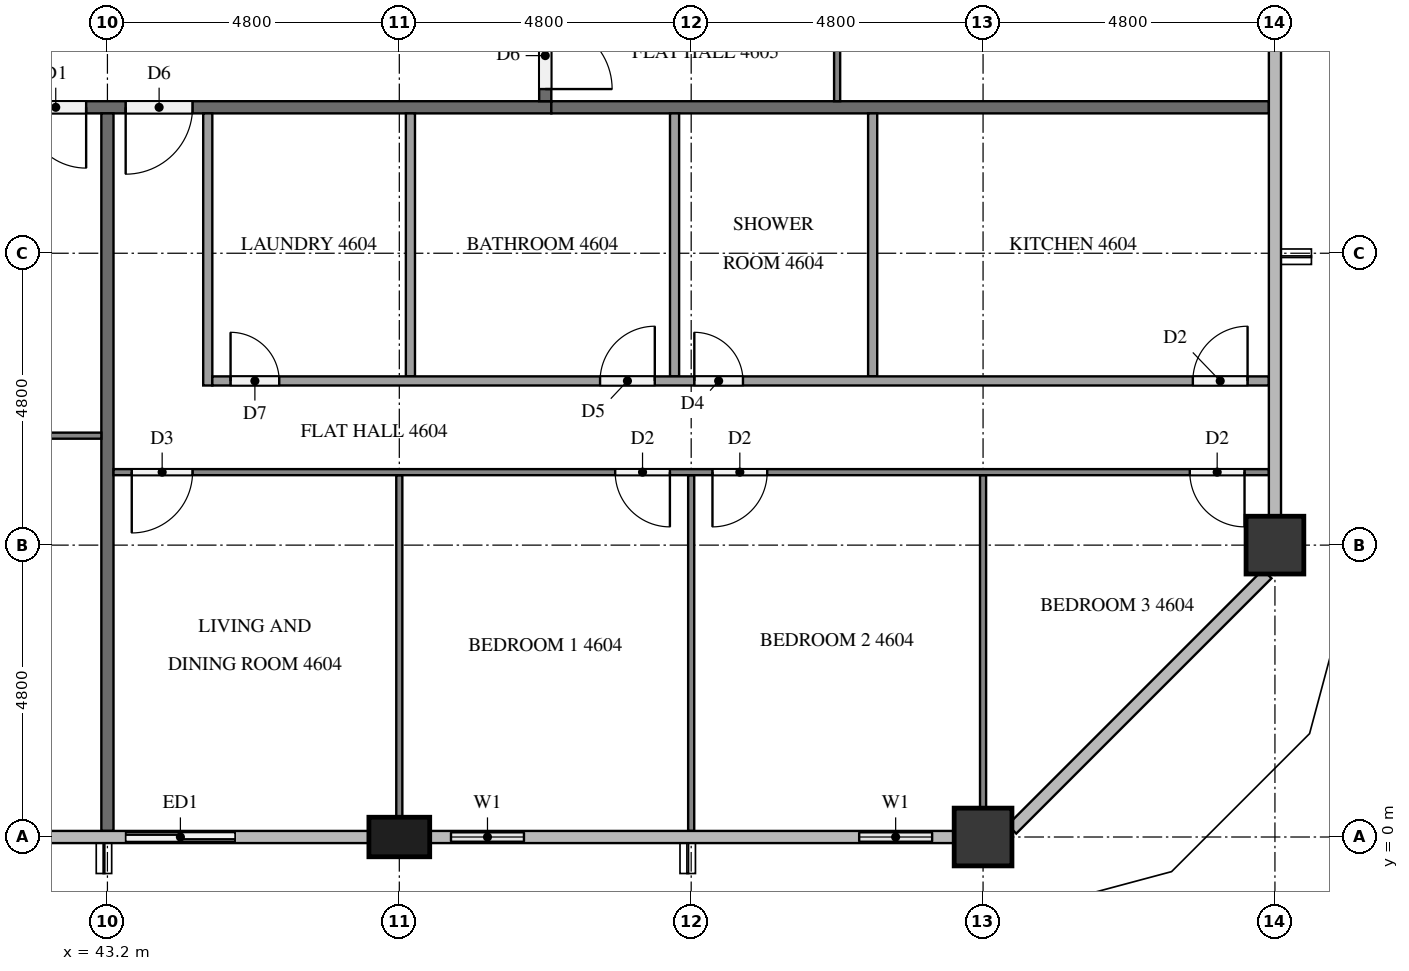
"""IFC4 building model, lengths in metres.
Left out: names, types, materials, properties, quantities, classifications, styles, units other than length and angle.
Written with IfcOpenShell. Run it as: python <this file> out.ifc"""

import sys

from ifc_helpers import new_model, si_unit, direction, frame, frame_2d, origin, origin_2d, place, context, subcontext, project, spatial, rectangle, extrude, element, fill, save


model = new_model("IFC4")
c1 = context("Model", 3, precision=1e-05, world=origin(), true_north=direction((0.0, 1.0)))
c2 = subcontext(c1, "Body", "Model", "MODEL_VIEW")
j1 = project(units=[si_unit("LENGTHUNIT", "METRE"), si_unit("PLANEANGLEUNIT", "RADIAN")], contexts=[c1])
p1 = place(None, origin())
s1 = spatial("IfcSite", under=j1, at=p1, CompositionType="ELEMENT")
p2 = place(p1, origin())
s2 = spatial("IfcBuilding", under=s1, at=p2, CompositionType="ELEMENT")
p3 = place(p2, frame((0.0, 0.0, 178.9)))
s3 = spatial("IfcBuildingStorey", under=s2, at=p3, CompositionType="ELEMENT", Elevation=178.9)
p4 = place(p3, frame((48.0, 0.0, 0.0), z_axis=(0.0, 0.0, 1.0), x_axis=(1.0, 0.0, 0.0)))
e1 = element("IfcColumn", 1, at=p4, inside=s3, PredefinedType="COLUMN", context=c2, shape_type="SweptSolid", body=[
    extrude(rectangle(XDim=1.0, YDim=0.65, at=origin_2d()), origin(), (0.0, 0.0, 1.0), 3.2),
])
for number, where, z_axis, x_axis in (
    (2, (57.6, 0.0, 0.0), (0.0, 0.0, 1.0), (1.0, 0.0, 0.0)),
    (3, (62.4, 4.8, 0.0), (0.0, 0.0, 1.0), (1.0, 0.0, 0.0)),
):
    element("IfcColumn", number, at=place(p3, frame(where, z_axis=z_axis, x_axis=x_axis)), inside=s3, PredefinedType="COLUMN", context=c2, shape_type="SweptSolid", body=[
        extrude(rectangle(XDim=0.95, YDim=0.95, at=origin_2d()), origin(), (0.0, 0.0, 1.0), 3.2),
    ])
p5 = place(p3, frame((43.2, 0.0, 0.0), z_axis=(0.0, 0.0, 1.0), x_axis=(1.0, 0.0, 0.0)))
e4 = element("IfcWall", 4, at=p5, inside=s3, PredefinedType="SOLIDWALL", context=c2, shape_type="SweptSolid", body=[
    extrude(rectangle(XDim=2.4, YDim=0.15, at=frame_2d((1.2, 0.0))), origin(), (0.0, 0.0, 1.0), 3.2),
])
p6 = place(p5, frame((0.3, 0.0, 0.0)))
e5 = element("IfcOpeningElement", 5, at=p6, cuts=e4, PredefinedType="OPENING", context=c2, shape_type="SweptSolid", body=[
    extrude(rectangle(XDim=1.8, YDim=2.4, at=frame_2d((0.9, 1.2))), frame((0.0, 0.085, 0.0), z_axis=(0.0, -1.0, 0.0), x_axis=(1.0, 0.0, 0.0)), (0.0, 0.0, 1.0), 0.17),
])
p7 = place(p3, frame((48.5, 0.0, 0.0), z_axis=(0.0, 0.0, 1.0), x_axis=(1.0, 0.0, 0.0)))
e6 = element("IfcWall", 6, at=p7, inside=s3, PredefinedType="SOLIDWALL", context=c2, shape_type="SweptSolid", body=[
    extrude(rectangle(XDim=1.9, YDim=0.15, at=frame_2d((0.95, 0.0))), origin(), (0.0, 0.0, 1.0), 3.2),
])
p8 = place(p7, frame((0.35, 0.0, 0.9)))
e7 = element("IfcOpeningElement", 7, at=p8, cuts=e6, PredefinedType="OPENING", context=c2, shape_type="SweptSolid", body=[
    extrude(rectangle(XDim=1.2, YDim=1.4, at=frame_2d((0.6, 0.7))), frame((0.0, 0.085, 0.0), z_axis=(0.0, -1.0, 0.0), x_axis=(1.0, 0.0, 0.0)), (0.0, 0.0, 1.0), 0.17),
])
p9 = place(p3, frame((55.2, 0.0, 0.0), z_axis=(0.0, 0.0, 1.0), x_axis=(1.0, 0.0, 0.0)))
e8 = element("IfcWall", 8, at=p9, inside=s3, PredefinedType="SOLIDWALL", context=c2, shape_type="SweptSolid", body=[
    extrude(rectangle(XDim=1.925, YDim=0.15, at=frame_2d((0.962, 0.0))), origin(), (0.0, 0.0, 1.0), 3.2),
])
p10 = place(p9, frame((0.363, 0.0, 0.9)))
e9 = element("IfcOpeningElement", 9, at=p10, cuts=e8, PredefinedType="OPENING", context=c2, shape_type="SweptSolid", body=[
    extrude(rectangle(XDim=1.2, YDim=1.4, at=frame_2d((0.6, 0.7))), frame((0.0, 0.085, 0.0), z_axis=(0.0, -1.0, 0.0), x_axis=(1.0, 0.0, 0.0)), (0.0, 0.0, 1.0), 0.17),
])
p11 = place(p3, frame((50.5, 12.0, 0.0), z_axis=(0.0, 0.0, 1.0), x_axis=(-1.0, 0.0, 0.0)))
e10 = element("IfcWall", 10, at=p11, inside=s3, PredefinedType="PARTITIONING", context=c2, shape_type="SweptSolid", body=[
    extrude(rectangle(XDim=38.6, YDim=0.2, at=frame_2d((19.3, 0.0))), origin(), (0.0, 0.0, 1.0), 3.2),
])
p12 = place(p11, frame((31.65, 0.0, 0.0)))
e11 = element("IfcOpeningElement", 11, at=p12, cuts=e10, PredefinedType="OPENING", context=c2, shape_type="SweptSolid", body=[
    extrude(rectangle(XDim=1.0, YDim=2.1, at=frame_2d((0.5, 1.05))), frame((0.0, 0.11, 0.0), z_axis=(0.0, -1.0, 0.0), x_axis=(1.0, 0.0, 0.0)), (0.0, 0.0, 1.0), 0.22),
])
p13 = place(p11, frame((17.25, 0.0, 0.0)))
e12 = element("IfcOpeningElement", 12, at=p13, cuts=e10, PredefinedType="OPENING", context=c2, shape_type="SweptSolid", body=[
    extrude(rectangle(XDim=1.0, YDim=2.1, at=frame_2d((0.5, 1.05))), frame((0.0, 0.11, 0.0), z_axis=(0.0, -1.0, 0.0), x_axis=(1.0, 0.0, 0.0)), (0.0, 0.0, 1.0), 0.22),
])
p14 = place(p11, frame((7.65, 0.0, 0.0)))
e13 = element("IfcOpeningElement", 13, at=p14, cuts=e10, PredefinedType="OPENING", context=c2, shape_type="SweptSolid", body=[
    extrude(rectangle(XDim=1.0, YDim=2.1, at=frame_2d((0.5, 1.05))), frame((0.0, 0.11, 0.0), z_axis=(0.0, -1.0, 0.0), x_axis=(1.0, 0.0, 0.0)), (0.0, 0.0, 1.0), 0.22),
])
p15 = place(p11, frame((5.9, 0.0, 0.0)))
e14 = element("IfcOpeningElement", 14, at=p15, cuts=e10, PredefinedType="OPENING", context=c2, shape_type="SweptSolid", body=[
    extrude(rectangle(XDim=1.1, YDim=2.1, at=frame_2d((0.55, 1.05))), frame((0.0, 0.11, 0.0), z_axis=(0.0, -1.0, 0.0), x_axis=(1.0, 0.0, 0.0)), (0.0, 0.0, 1.0), 0.22),
])
p16 = place(p3, frame((50.4, 40.7, 0.0), z_axis=(0.0, 0.0, 1.0), x_axis=(0.0, -1.0, 0.0)))
e15 = element("IfcWall", 15, at=p16, inside=s3, PredefinedType="PARTITIONING", context=c2, shape_type="SweptSolid", body=[
    extrude(rectangle(XDim=28.6, YDim=0.2, at=frame_2d((14.3, 0.0))), origin(), (0.0, 0.0, 1.0), 3.2),
])
p17 = place(p16, frame((27.3, 0.0, 0.0)))
e16 = element("IfcOpeningElement", 16, at=p17, cuts=e15, PredefinedType="OPENING", context=c2, shape_type="SweptSolid", body=[
    extrude(rectangle(XDim=1.1, YDim=2.1, at=frame_2d((0.55, 1.05))), frame((0.0, 0.11, 0.0), z_axis=(0.0, -1.0, 0.0), x_axis=(1.0, 0.0, 0.0)), (0.0, 0.0, 1.0), 0.22),
])
p18 = place(p16, frame((8.15, 0.0, 0.0)))
e17 = element("IfcOpeningElement", 17, at=p18, cuts=e15, PredefinedType="OPENING", context=c2, shape_type="SweptSolid", body=[
    extrude(rectangle(XDim=1.0, YDim=2.1, at=frame_2d((0.5, 1.05))), frame((0.0, 0.11, 0.0), z_axis=(0.0, -1.0, 0.0), x_axis=(1.0, 0.0, 0.0)), (0.0, 0.0, 1.0), 0.22),
])
p19 = place(p16, frame((0.95, 0.0, 0.0)))
e18 = element("IfcOpeningElement", 18, at=p19, cuts=e15, PredefinedType="OPENING", context=c2, shape_type="SweptSolid", body=[
    extrude(rectangle(XDim=1.0, YDim=2.1, at=frame_2d((0.5, 1.05))), frame((0.0, 0.11, 0.0), z_axis=(0.0, -1.0, 0.0), x_axis=(1.0, 0.0, 0.0)), (0.0, 0.0, 1.0), 0.22),
])
p20 = place(p3, frame((43.2, 11.9, 0.0), z_axis=(0.0, 0.0, 1.0), x_axis=(0.0, -1.0, 0.0)))
e19 = element("IfcWall", 19, at=p20, inside=s3, PredefinedType="PARTITIONING", context=c2, shape_type="SweptSolid", body=[
    extrude(rectangle(XDim=11.8, YDim=0.2, at=frame_2d((5.9, 0.0))), origin(), (0.0, 0.0, 1.0), 3.2),
])
p21 = place(p3, frame((50.5, 12.0, 0.0), z_axis=(0.0, 0.0, 1.0), x_axis=(1.0, 0.0, 0.0)))
e20 = element("IfcWall", 20, at=p21, inside=s3, PredefinedType="PARTITIONING", context=c2, shape_type="SweptSolid", body=[
    extrude(rectangle(XDim=11.8, YDim=0.2, at=frame_2d((5.9, 0.0))), origin(), (0.0, 0.0, 1.0), 3.2),
])
p22 = place(p3, frame((43.1, 6.6, 0.0), z_axis=(0.0, 0.0, 1.0), x_axis=(-1.0, 0.0, 0.0)))
e21 = element("IfcWall", 21, at=p22, inside=s3, PredefinedType="PARTITIONING", context=c2, shape_type="SweptSolid", body=[
    extrude(rectangle(XDim=9.4, YDim=0.1, at=frame_2d((4.7, 0.0))), origin(), (0.0, 0.0, 1.0), 3.2),
])
p23 = place(p22, frame((3.35, 0.0, 0.0)))
e22 = element("IfcOpeningElement", 22, at=p23, cuts=e21, PredefinedType="OPENING", context=c2, shape_type="SweptSolid", body=[
    extrude(rectangle(XDim=1.0, YDim=2.1, at=frame_2d((0.5, 1.05))), frame((0.0, 0.06, 0.0), z_axis=(0.0, -1.0, 0.0), x_axis=(1.0, 0.0, 0.0)), (0.0, 0.0, 1.0), 0.12),
])
p24 = place(p22, frame((5.05, 0.0, 0.0)))
e23 = element("IfcOpeningElement", 23, at=p24, cuts=e21, PredefinedType="OPENING", context=c2, shape_type="SweptSolid", body=[
    extrude(rectangle(XDim=0.9, YDim=2.1, at=frame_2d((0.45, 1.05))), frame((0.0, 0.06, 0.0), z_axis=(0.0, -1.0, 0.0), x_axis=(1.0, 0.0, 0.0)), (0.0, 0.0, 1.0), 0.12),
])
p25 = place(p3, frame((48.0, 5.95, 0.0), z_axis=(0.0, 0.0, 1.0), x_axis=(0.0, -1.0, 0.0)))
e24 = element("IfcWall", 24, at=p25, inside=s3, PredefinedType="PARTITIONING", context=c2, shape_type="SweptSolid", body=[
    extrude(rectangle(XDim=5.625, YDim=0.1, at=frame_2d((2.812, 0.0))), origin(), (0.0, 0.0, 1.0), 3.2),
])
p26 = place(p3, frame((52.8, 5.95, 0.0), z_axis=(0.0, 0.0, 1.0), x_axis=(0.0, -1.0, 0.0)))
e25 = element("IfcWall", 25, at=p26, inside=s3, PredefinedType="PARTITIONING", context=c2, shape_type="SweptSolid", body=[
    extrude(rectangle(XDim=5.85, YDim=0.1, at=frame_2d((2.925, 0.0))), origin(), (0.0, 0.0, 1.0), 3.2),
])
p27 = place(p3, frame((57.6, 5.95, 0.0), z_axis=(0.0, 0.0, 1.0), x_axis=(0.0, -1.0, 0.0)))
e26 = element("IfcWall", 26, at=p27, inside=s3, PredefinedType="PARTITIONING", context=c2, shape_type="SweptSolid", body=[
    extrude(rectangle(XDim=5.475, YDim=0.1, at=frame_2d((2.737, 0.0))), origin(), (0.0, 0.0, 1.0), 3.2),
])
p28 = place(p3, frame((62.3, 6.0, 0.0), z_axis=(0.0, 0.0, 1.0), x_axis=(-1.0, 0.0, 0.0)))
e27 = element("IfcWall", 27, at=p28, inside=s3, PredefinedType="PARTITIONING", context=c2, shape_type="SweptSolid", body=[
    extrude(rectangle(XDim=19.0, YDim=0.1, at=frame_2d((9.5, 0.0))), origin(), (0.0, 0.0, 1.0), 3.2),
])
p29 = place(p28, frame((17.7, 0.0, 0.0)))
e28 = element("IfcOpeningElement", 28, at=p29, cuts=e27, PredefinedType="OPENING", context=c2, shape_type="SweptSolid", body=[
    extrude(rectangle(XDim=1.0, YDim=2.1, at=frame_2d((0.5, 1.05))), frame((0.0, 0.06, 0.0), z_axis=(0.0, -1.0, 0.0), x_axis=(1.0, 0.0, 0.0)), (0.0, 0.0, 1.0), 0.12),
])
p30 = place(p28, frame((9.85, 0.0, 0.0)))
e29 = element("IfcOpeningElement", 29, at=p30, cuts=e27, PredefinedType="OPENING", context=c2, shape_type="SweptSolid", body=[
    extrude(rectangle(XDim=0.9, YDim=2.1, at=frame_2d((0.45, 1.05))), frame((0.0, 0.06, 0.0), z_axis=(0.0, -1.0, 0.0), x_axis=(1.0, 0.0, 0.0)), (0.0, 0.0, 1.0), 0.12),
])
p31 = place(p28, frame((8.25, 0.0, 0.0)))
e30 = element("IfcOpeningElement", 30, at=p31, cuts=e27, PredefinedType="OPENING", context=c2, shape_type="SweptSolid", body=[
    extrude(rectangle(XDim=0.9, YDim=2.1, at=frame_2d((0.45, 1.05))), frame((0.0, 0.06, 0.0), z_axis=(0.0, -1.0, 0.0), x_axis=(1.0, 0.0, 0.0)), (0.0, 0.0, 1.0), 0.12),
])
p32 = place(p28, frame((0.4, 0.0, 0.0)))
e31 = element("IfcOpeningElement", 31, at=p32, cuts=e27, PredefinedType="OPENING", context=c2, shape_type="SweptSolid", body=[
    extrude(rectangle(XDim=0.9, YDim=2.1, at=frame_2d((0.45, 1.05))), frame((0.0, 0.06, 0.0), z_axis=(0.0, -1.0, 0.0), x_axis=(1.0, 0.0, 0.0)), (0.0, 0.0, 1.0), 0.12),
])
for number, where, z_axis, x_axis in (
    (32, (48.183, 11.9, 0.0), (0.0, 0.0, 1.0), (0.0, -1.0, 0.0)),
    (33, (52.527, 11.9, 0.0), (0.0, 0.0, 1.0), (0.0, -1.0, 0.0)),
    (34, (55.784, 11.9, 0.0), (0.0, 0.0, 1.0), (0.0, -1.0, 0.0)),
):
    element("IfcWall", number, at=place(p3, frame(where, z_axis=z_axis, x_axis=x_axis)), inside=s3, PredefinedType="PARTITIONING", context=c2, shape_type="SweptSolid", body=[
        extrude(rectangle(XDim=4.325, YDim=0.15, at=frame_2d((2.163, 0.0))), origin(), (0.0, 0.0, 1.0), 3.2),
    ])
p33 = place(p3, frame((44.85, 11.9, 0.0), z_axis=(0.0, 0.0, 1.0), x_axis=(0.0, -1.0, 0.0)))
e35 = element("IfcWall", 35, at=p33, inside=s3, PredefinedType="PARTITIONING", context=c2, shape_type="SweptSolid", body=[
    extrude(rectangle(XDim=4.475, YDim=0.15, at=frame_2d((2.237, 0.0))), origin(), (0.0, 0.0, 1.0), 3.2),
])
p34 = place(p3, frame((44.925, 7.5, 0.0), z_axis=(0.0, 0.0, 1.0), x_axis=(1.0, 0.0, 0.0)))
e36 = element("IfcWall", 36, at=p34, inside=s3, PredefinedType="PARTITIONING", context=c2, shape_type="SweptSolid", body=[
    extrude(rectangle(XDim=17.375, YDim=0.15, at=frame_2d((8.688, 0.0))), origin(), (0.0, 0.0, 1.0), 3.2),
])
p35 = place(p34, frame((0.3, 0.0, 0.0)))
e37 = element("IfcOpeningElement", 37, at=p35, cuts=e36, PredefinedType="OPENING", context=c2, shape_type="SweptSolid", body=[
    extrude(rectangle(XDim=0.8, YDim=2.1, at=frame_2d((0.4, 1.05))), frame((0.0, 0.085, 0.0), z_axis=(0.0, -1.0, 0.0), x_axis=(1.0, 0.0, 0.0)), (0.0, 0.0, 1.0), 0.17),
])
p36 = place(p34, frame((6.377, 0.0, 0.0)))
e38 = element("IfcOpeningElement", 38, at=p36, cuts=e36, PredefinedType="OPENING", context=c2, shape_type="SweptSolid", body=[
    extrude(rectangle(XDim=0.9, YDim=2.1, at=frame_2d((0.45, 1.05))), frame((0.0, 0.085, 0.0), z_axis=(0.0, -1.0, 0.0), x_axis=(1.0, 0.0, 0.0)), (0.0, 0.0, 1.0), 0.17),
])
p37 = place(p34, frame((7.927, 0.0, 0.0)))
e39 = element("IfcOpeningElement", 39, at=p37, cuts=e36, PredefinedType="OPENING", context=c2, shape_type="SweptSolid", body=[
    extrude(rectangle(XDim=0.8, YDim=2.1, at=frame_2d((0.4, 1.05))), frame((0.0, 0.085, 0.0), z_axis=(0.0, -1.0, 0.0), x_axis=(1.0, 0.0, 0.0)), (0.0, 0.0, 1.0), 0.17),
])
p38 = place(p34, frame((16.125, 0.0, 0.0)))
e40 = element("IfcOpeningElement", 40, at=p38, cuts=e36, PredefinedType="OPENING", context=c2, shape_type="SweptSolid", body=[
    extrude(rectangle(XDim=0.9, YDim=2.1, at=frame_2d((0.45, 1.05))), frame((0.0, 0.085, 0.0), z_axis=(0.0, -1.0, 0.0), x_axis=(1.0, 0.0, 0.0)), (0.0, 0.0, 1.0), 0.17),
])
p39 = place(p3, frame((55.2, 31.1, 0.0), z_axis=(0.0, 0.0, 1.0), x_axis=(0.0, -1.0, 0.0)))
e41 = element("IfcWall", 41, at=p39, inside=s3, PredefinedType="PARTITIONING", context=c2, shape_type="SweptSolid", body=[
    extrude(rectangle(XDim=19.0, YDim=0.1, at=frame_2d((9.5, 0.0))), origin(), (0.0, 0.0, 1.0), 3.2),
])
p40 = place(p39, frame((14.65, 0.0, 0.0)))
e42 = element("IfcOpeningElement", 42, at=p40, cuts=e41, PredefinedType="OPENING", context=c2, shape_type="SweptSolid", body=[
    extrude(rectangle(XDim=0.9, YDim=2.1, at=frame_2d((0.45, 1.05))), frame((0.0, 0.06, 0.0), z_axis=(0.0, -1.0, 0.0), x_axis=(1.0, 0.0, 0.0)), (0.0, 0.0, 1.0), 0.12),
])
p41 = place(p39, frame((12.95, 0.0, 0.0)))
e43 = element("IfcOpeningElement", 43, at=p41, cuts=e41, PredefinedType="OPENING", context=c2, shape_type="SweptSolid", body=[
    extrude(rectangle(XDim=1.0, YDim=2.1, at=frame_2d((0.5, 1.05))), frame((0.0, 0.06, 0.0), z_axis=(0.0, -1.0, 0.0), x_axis=(1.0, 0.0, 0.0)), (0.0, 0.0, 1.0), 0.12),
])
p42 = place(p39, frame((5.05, 0.0, 0.0)))
e44 = element("IfcOpeningElement", 44, at=p42, cuts=e41, PredefinedType="OPENING", context=c2, shape_type="SweptSolid", body=[
    extrude(rectangle(XDim=0.9, YDim=2.1, at=frame_2d((0.45, 1.05))), frame((0.0, 0.06, 0.0), z_axis=(0.0, -1.0, 0.0), x_axis=(1.0, 0.0, 0.0)), (0.0, 0.0, 1.0), 0.12),
])
p43 = place(p39, frame((3.45, 0.0, 0.0)))
e45 = element("IfcOpeningElement", 45, at=p43, cuts=e41, PredefinedType="OPENING", context=c2, shape_type="SweptSolid", body=[
    extrude(rectangle(XDim=0.9, YDim=2.1, at=frame_2d((0.45, 1.05))), frame((0.0, 0.06, 0.0), z_axis=(0.0, -1.0, 0.0), x_axis=(1.0, 0.0, 0.0)), (0.0, 0.0, 1.0), 0.12),
])
p44 = place(p6, origin())
e46 = element("IfcDoor", 46, at=p44, inside=s3, OperationType="SLIDING_TO_LEFT", PredefinedType="DOOR", context=c2, shape_type="SweptSolid", body=[
    extrude(rectangle(XDim=1.8, YDim=2.4, at=frame_2d((0.9, 1.2))), frame((0.0, 0.025, 0.0), z_axis=(0.0, -1.0, 0.0), x_axis=(1.0, 0.0, 0.0)), (0.0, 0.0, 1.0), 0.05),
])
fill(e5, e46)
p45 = place(p8, origin())
e47 = element("IfcWindow", 47, at=p45, inside=s3, PartitioningType="SINGLE_PANEL", PredefinedType="WINDOW", context=c2, shape_type="SweptSolid", body=[
    extrude(rectangle(XDim=1.2, YDim=1.4, at=frame_2d((0.6, 0.7))), frame((0.0, 0.03, 0.0), z_axis=(0.0, -1.0, 0.0), x_axis=(1.0, 0.0, 0.0)), (0.0, 0.0, 1.0), 0.06),
])
fill(e7, e47)
p46 = place(p10, origin())
e48 = element("IfcWindow", 48, at=p46, inside=s3, PartitioningType="SINGLE_PANEL", PredefinedType="WINDOW", context=c2, shape_type="SweptSolid", body=[
    extrude(rectangle(XDim=1.2, YDim=1.4, at=frame_2d((0.6, 0.7))), frame((0.0, 0.03, 0.0), z_axis=(0.0, -1.0, 0.0), x_axis=(1.0, 0.0, 0.0)), (0.0, 0.0, 1.0), 0.06),
])
fill(e9, e48)
p47 = place(p14, origin())
e49 = element("IfcDoor", 49, at=p47, inside=s3, OperationType="SINGLE_SWING_LEFT", PredefinedType="DOOR", context=c2, shape_type="SweptSolid", body=[
    extrude(rectangle(XDim=1.0, YDim=2.1, at=frame_2d((0.5, 1.05))), frame((0.0, 0.025, 0.0), z_axis=(0.0, -1.0, 0.0), x_axis=(1.0, 0.0, 0.0)), (0.0, 0.0, 1.0), 0.05),
])
fill(e13, e49)
p48 = place(p15, origin())
e50 = element("IfcDoor", 50, at=p48, inside=s3, OperationType="SINGLE_SWING_RIGHT", PredefinedType="DOOR", context=c2, shape_type="SweptSolid", body=[
    extrude(rectangle(XDim=1.1, YDim=2.1, at=frame_2d((0.55, 1.05))), frame((0.0, 0.025, 0.0), z_axis=(0.0, -1.0, 0.0), x_axis=(1.0, 0.0, 0.0)), (0.0, 0.0, 1.0), 0.05),
])
fill(e14, e50)
p49 = place(p17, origin())
e51 = element("IfcDoor", 51, at=p49, inside=s3, OperationType="SINGLE_SWING_RIGHT", PredefinedType="DOOR", context=c2, shape_type="SweptSolid", body=[
    extrude(rectangle(XDim=1.1, YDim=2.1, at=frame_2d((0.55, 1.05))), frame((0.0, 0.025, 0.0), z_axis=(0.0, -1.0, 0.0), x_axis=(1.0, 0.0, 0.0)), (0.0, 0.0, 1.0), 0.05),
])
fill(e16, e51)
p50 = place(p29, origin())
e52 = element("IfcDoor", 52, at=p50, inside=s3, OperationType="SINGLE_SWING_RIGHT", PredefinedType="DOOR", context=c2, shape_type="SweptSolid", body=[
    extrude(rectangle(XDim=1.0, YDim=2.1, at=frame_2d((0.5, 1.05))), frame((0.0, 0.025, 0.0), z_axis=(0.0, -1.0, 0.0), x_axis=(1.0, 0.0, 0.0)), (0.0, 0.0, 1.0), 0.05),
])
fill(e28, e52)
p51 = place(p30, origin())
e53 = element("IfcDoor", 53, at=p51, inside=s3, OperationType="SINGLE_SWING_LEFT", PredefinedType="DOOR", context=c2, shape_type="SweptSolid", body=[
    extrude(rectangle(XDim=0.9, YDim=2.1, at=frame_2d((0.45, 1.05))), frame((0.0, 0.025, 0.0), z_axis=(0.0, -1.0, 0.0), x_axis=(1.0, 0.0, 0.0)), (0.0, 0.0, 1.0), 0.05),
])
fill(e29, e53)
p52 = place(p31, origin())
e54 = element("IfcDoor", 54, at=p52, inside=s3, OperationType="SINGLE_SWING_RIGHT", PredefinedType="DOOR", context=c2, shape_type="SweptSolid", body=[
    extrude(rectangle(XDim=0.9, YDim=2.1, at=frame_2d((0.45, 1.05))), frame((0.0, 0.025, 0.0), z_axis=(0.0, -1.0, 0.0), x_axis=(1.0, 0.0, 0.0)), (0.0, 0.0, 1.0), 0.05),
])
fill(e30, e54)
p53 = place(p32, origin())
e55 = element("IfcDoor", 55, at=p53, inside=s3, OperationType="SINGLE_SWING_LEFT", PredefinedType="DOOR", context=c2, shape_type="SweptSolid", body=[
    extrude(rectangle(XDim=0.9, YDim=2.1, at=frame_2d((0.45, 1.05))), frame((0.0, 0.025, 0.0), z_axis=(0.0, -1.0, 0.0), x_axis=(1.0, 0.0, 0.0)), (0.0, 0.0, 1.0), 0.05),
])
fill(e31, e55)
p54 = place(p35, origin())
e56 = element("IfcDoor", 56, at=p54, inside=s3, OperationType="SINGLE_SWING_LEFT", PredefinedType="DOOR", context=c2, shape_type="SweptSolid", body=[
    extrude(rectangle(XDim=0.8, YDim=2.1, at=frame_2d((0.4, 1.05))), frame((0.0, 0.025, 0.0), z_axis=(0.0, -1.0, 0.0), x_axis=(1.0, 0.0, 0.0)), (0.0, 0.0, 1.0), 0.05),
])
fill(e37, e56)
p55 = place(p36, origin())
e57 = element("IfcDoor", 57, at=p55, inside=s3, OperationType="SINGLE_SWING_RIGHT", PredefinedType="DOOR", context=c2, shape_type="SweptSolid", body=[
    extrude(rectangle(XDim=0.9, YDim=2.1, at=frame_2d((0.45, 1.05))), frame((0.0, 0.025, 0.0), z_axis=(0.0, -1.0, 0.0), x_axis=(1.0, 0.0, 0.0)), (0.0, 0.0, 1.0), 0.05),
])
fill(e38, e57)
p56 = place(p37, origin())
e58 = element("IfcDoor", 58, at=p56, inside=s3, OperationType="SINGLE_SWING_LEFT", PredefinedType="DOOR", context=c2, shape_type="SweptSolid", body=[
    extrude(rectangle(XDim=0.8, YDim=2.1, at=frame_2d((0.4, 1.05))), frame((0.0, 0.025, 0.0), z_axis=(0.0, -1.0, 0.0), x_axis=(1.0, 0.0, 0.0)), (0.0, 0.0, 1.0), 0.05),
])
fill(e39, e58)
p57 = place(p38, origin())
e59 = element("IfcDoor", 59, at=p57, inside=s3, OperationType="SINGLE_SWING_RIGHT", PredefinedType="DOOR", context=c2, shape_type="SweptSolid", body=[
    extrude(rectangle(XDim=0.9, YDim=2.1, at=frame_2d((0.45, 1.05))), frame((0.0, 0.025, 0.0), z_axis=(0.0, -1.0, 0.0), x_axis=(1.0, 0.0, 0.0)), (0.0, 0.0, 1.0), 0.05),
])
fill(e40, e59)
save(model, sys.argv[1])
